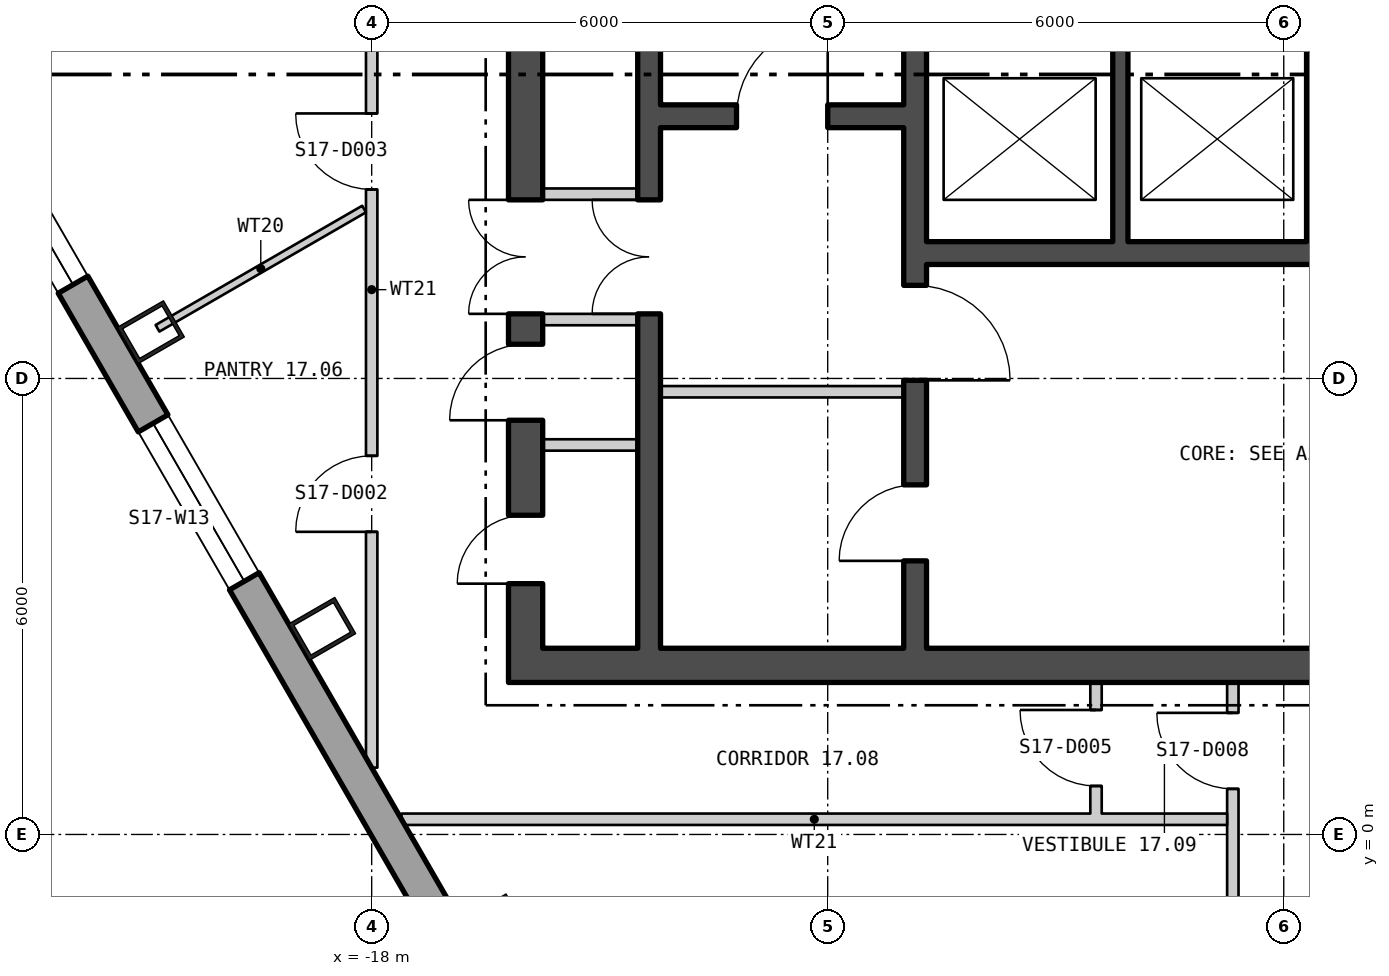
"""IFC4 building model, lengths in metres.
Left out: names, types, materials, properties, quantities, classifications, styles, units other than length and angle.
Written with IfcOpenShell. Run it as: python <this file> out.ifc"""

import sys

from ifc_helpers import new_model, si_unit, direction, frame, frame_2d, origin, origin_2d, place, context, subcontext, project, spatial, polyline, rectangle, hollow_rectangle, outline, extrude, element, fill, save


model = new_model("IFC4")
c1 = context("Model", 3, precision=1e-05, world=origin(), true_north=direction((0.0, 1.0)))
c2 = subcontext(c1, "Body", "Model", "MODEL_VIEW")
j1 = project(units=[si_unit("LENGTHUNIT", "METRE"), si_unit("PLANEANGLEUNIT", "RADIAN")], contexts=[c1])
p1 = place(None, origin())
s1 = spatial("IfcSite", under=j1, at=p1, CompositionType="ELEMENT")
p2 = place(p1, origin())
s2 = spatial("IfcBuilding", under=s1, at=p2, CompositionType="ELEMENT")
p3 = place(p2, frame((0.0, 0.0, 227.7)))
s3 = spatial("IfcBuildingStorey", under=s2, at=p3, CompositionType="ELEMENT", Elevation=227.7)
for number, where, z_axis, x_axis in (
    (1, (-20.905, 6.609, 0.0), (0.0, 0.0, 1.0), (0.5, -0.866, 0.0)),
    (2, (-18.651, 2.706, 0.0), (0.0, 0.0, 1.0), (0.5, -0.866, 0.0)),
    (3, (-16.398, -1.196, 0.0), (0.0, 0.0, 1.0), (0.5, -0.866, 0.0)),
):
    element("IfcColumn", number, at=place(p3, frame(where, z_axis=z_axis, x_axis=x_axis)), inside=s3, PredefinedType="COLUMN", context=c2, shape_type="SweptSolid", body=[
        extrude(hollow_rectangle(XDim=0.55, YDim=0.7, WallThickness=0.05, at=origin_2d()), origin(), (0.0, 0.0, 1.0), 3.9),
    ])
p4 = place(p3, frame((-26.075, 14.415, -0.18), z_axis=(0.0, 0.0, 1.0), x_axis=(0.499999194392, -0.866025868902, 0.0)))
e4 = element("IfcWall", 4, at=p4, inside=s3, PredefinedType="SOLIDWALL", context=c2, shape_type="SweptSolid", body=[
    extrude(outline(polyline([(-0.13, -0.225), (45.86, -0.225), (45.6, 0.225), (0.13, 0.225), (-0.13, -0.225)])), origin(), (0.0, 0.0, 1.0), 3.68),
])
p5 = place(p4, frame((1.424, 0.0, 1.08)))
e5 = element("IfcOpeningElement", 5, at=p5, cuts=e4, PredefinedType="OPENING", context=c2, shape_type="SweptSolid", body=[
    extrude(rectangle(XDim=2.4, YDim=2.0, at=frame_2d((1.2, 1.0))), frame((0.0, 0.235, 0.0), z_axis=(0.0, -1.0, 0.0), x_axis=(1.0, 0.0, 0.0)), (0.0, 0.0, 1.0), 0.47),
])
p6 = place(p4, frame((5.892, 0.0, 1.08)))
e6 = element("IfcOpeningElement", 6, at=p6, cuts=e4, PredefinedType="OPENING", context=c2, shape_type="SweptSolid", body=[
    extrude(rectangle(XDim=2.4, YDim=2.0, at=frame_2d((1.2, 1.0))), frame((0.0, 0.235, 0.0), z_axis=(0.0, -1.0, 0.0), x_axis=(1.0, 0.0, 0.0)), (0.0, 0.0, 1.0), 0.47),
])
p7 = place(p4, frame((10.399, 0.0, 1.08)))
e7 = element("IfcOpeningElement", 7, at=p7, cuts=e4, PredefinedType="OPENING", context=c2, shape_type="SweptSolid", body=[
    extrude(rectangle(XDim=2.4, YDim=2.0, at=frame_2d((1.2, 1.0))), frame((0.0, 0.235, 0.0), z_axis=(0.0, -1.0, 0.0), x_axis=(1.0, 0.0, 0.0)), (0.0, 0.0, 1.0), 0.47),
])
p8 = place(p4, frame((19.412, 0.0, 1.08)))
e8 = element("IfcOpeningElement", 8, at=p8, cuts=e4, PredefinedType="OPENING", context=c2, shape_type="SweptSolid", body=[
    extrude(rectangle(XDim=2.4, YDim=2.0, at=frame_2d((1.2, 1.0))), frame((0.0, 0.235, 0.0), z_axis=(0.0, -1.0, 0.0), x_axis=(1.0, 0.0, 0.0)), (0.0, 0.0, 1.0), 0.47),
])
p9 = place(p4, frame((23.918, 0.0, 1.08)))
e9 = element("IfcOpeningElement", 9, at=p9, cuts=e4, PredefinedType="OPENING", context=c2, shape_type="SweptSolid", body=[
    extrude(rectangle(XDim=2.4, YDim=2.0, at=frame_2d((1.2, 1.0))), frame((0.0, 0.235, 0.0), z_axis=(0.0, -1.0, 0.0), x_axis=(1.0, 0.0, 0.0)), (0.0, 0.0, 1.0), 0.47),
])
p10 = place(p4, frame((28.425, 0.0, 1.08)))
e10 = element("IfcOpeningElement", 10, at=p10, cuts=e4, PredefinedType="OPENING", context=c2, shape_type="SweptSolid", body=[
    extrude(rectangle(XDim=2.4, YDim=2.0, at=frame_2d((1.2, 1.0))), frame((0.0, 0.235, 0.0), z_axis=(0.0, -1.0, 0.0), x_axis=(1.0, 0.0, 0.0)), (0.0, 0.0, 1.0), 0.47),
])
p11 = place(p4, frame((32.932, 0.0, 1.08)))
e11 = element("IfcOpeningElement", 11, at=p11, cuts=e4, PredefinedType="OPENING", context=c2, shape_type="SweptSolid", body=[
    extrude(rectangle(XDim=2.4, YDim=2.0, at=frame_2d((1.2, 1.0))), frame((0.0, 0.235, 0.0), z_axis=(0.0, -1.0, 0.0), x_axis=(1.0, 0.0, 0.0)), (0.0, 0.0, 1.0), 0.47),
])
p12 = place(p4, frame((41.907, 0.0, 1.08)))
e12 = element("IfcOpeningElement", 12, at=p12, cuts=e4, PredefinedType="OPENING", context=c2, shape_type="SweptSolid", body=[
    extrude(rectangle(XDim=2.4, YDim=2.0, at=frame_2d((1.2, 1.0))), frame((0.0, 0.235, 0.0), z_axis=(0.0, -1.0, 0.0), x_axis=(1.0, 0.0, 0.0)), (0.0, 0.0, 1.0), 0.47),
])
p13 = place(p3, frame((-16.2, 2.225, 0.0), z_axis=(0.0, 0.0, 1.0), x_axis=(1.0, 0.0, 0.0)))
e13 = element("IfcWall", 13, at=p13, inside=s3, PredefinedType="SHEAR", context=c2, shape_type="SweptSolid", body=[
    extrude(rectangle(XDim=32.4, YDim=0.45, at=frame_2d((16.2, 0.0))), origin(), (0.0, 0.0, 1.0), 3.7),
])
p14 = place(p13, frame((10.7, 0.0, 0.0)))
e14 = element("IfcOpeningElement", 14, at=p14, cuts=e13, PredefinedType="OPENING", context=c2, shape_type="SweptSolid", body=[
    extrude(rectangle(XDim=1.8, YDim=2.4, at=frame_2d((0.9, 1.2))), frame((0.0, 0.235, 0.0), z_axis=(0.0, -1.0, 0.0), x_axis=(1.0, 0.0, 0.0)), (0.0, 0.0, 1.0), 0.47),
])
p15 = place(p13, frame((20.7, 0.0, 0.0)))
e15 = element("IfcOpeningElement", 15, at=p15, cuts=e13, PredefinedType="OPENING", context=c2, shape_type="SweptSolid", body=[
    extrude(rectangle(XDim=1.8, YDim=2.4, at=frame_2d((0.9, 1.2))), frame((0.0, 0.235, 0.0), z_axis=(0.0, -1.0, 0.0), x_axis=(1.0, 0.0, 0.0)), (0.0, 0.0, 1.0), 0.47),
])
p16 = place(p3, frame((-15.975, 2.45, 0.0), z_axis=(0.0, 0.0, 1.0), x_axis=(0.0, 1.0, 0.0)))
e16 = element("IfcWall", 16, at=p16, inside=s3, PredefinedType="SHEAR", context=c2, shape_type="SweptSolid", body=[
    extrude(rectangle(XDim=15.1, YDim=0.45, at=frame_2d((7.55, 0.0))), origin(), (0.0, 0.0, 1.0), 3.7),
])
p17 = place(p16, frame((4.4, 0.0, 0.0)))
e17 = element("IfcOpeningElement", 17, at=p17, cuts=e16, PredefinedType="OPENING", context=c2, shape_type="SweptSolid", body=[
    extrude(rectangle(XDim=1.5, YDim=2.1, at=frame_2d((0.75, 1.05))), frame((0.0, 0.235, 0.0), z_axis=(0.0, -1.0, 0.0), x_axis=(1.0, 0.0, 0.0)), (0.0, 0.0, 1.0), 0.47),
])
p18 = place(p16, frame((0.85, 0.0, 0.0)))
e18 = element("IfcOpeningElement", 18, at=p18, cuts=e16, PredefinedType="OPENING", context=c2, shape_type="SweptSolid", body=[
    extrude(rectangle(XDim=0.9, YDim=2.1, at=frame_2d((0.45, 1.05))), frame((0.0, 0.235, 0.0), z_axis=(0.0, -1.0, 0.0), x_axis=(1.0, 0.0, 0.0)), (0.0, 0.0, 1.0), 0.47),
])
p19 = place(p16, frame((3.0, 0.0, 0.0)))
e19 = element("IfcOpeningElement", 19, at=p19, cuts=e16, PredefinedType="OPENING", context=c2, shape_type="SweptSolid", body=[
    extrude(rectangle(XDim=1.0, YDim=2.1, at=frame_2d((0.5, 1.05))), frame((0.0, 0.235, 0.0), z_axis=(0.0, -1.0, 0.0), x_axis=(1.0, 0.0, 0.0)), (0.0, 0.0, 1.0), 0.47),
])
p20 = place(p16, frame((8.951, 0.0, 0.0)))
e20 = element("IfcOpeningElement", 20, at=p20, cuts=e16, PredefinedType="OPENING", context=c2, shape_type="SweptSolid", body=[
    extrude(rectangle(XDim=0.9, YDim=2.1, at=frame_2d((0.45, 1.05))), frame((0.0, 0.235, 0.0), z_axis=(0.0, -1.0, 0.0), x_axis=(1.0, 0.0, 0.0)), (0.0, 0.0, 1.0), 0.47),
])
p21 = place(p16, frame((13.551, 0.0, 0.0)))
e21 = element("IfcOpeningElement", 21, at=p21, cuts=e16, PredefinedType="OPENING", context=c2, shape_type="SweptSolid", body=[
    extrude(rectangle(XDim=0.9, YDim=2.1, at=frame_2d((0.45, 1.05))), frame((0.0, 0.235, 0.0), z_axis=(0.0, -1.0, 0.0), x_axis=(1.0, 0.0, 0.0)), (0.0, 0.0, 1.0), 0.47),
])
p22 = place(p3, frame((-10.85, 2.45, 0.0), z_axis=(0.0, 0.0, 1.0), x_axis=(0.0, 1.0, 0.0)))
e22 = element("IfcWall", 22, at=p22, inside=s3, PredefinedType="SHEAR", context=c2, shape_type="SweptSolid", body=[
    extrude(rectangle(XDim=15.1, YDim=0.3, at=frame_2d((7.55, 0.0))), origin(), (0.0, 0.0, 1.0), 3.7),
])
p23 = place(p22, frame((3.525, 0.0, 0.0)))
e23 = element("IfcOpeningElement", 23, at=p23, cuts=e22, PredefinedType="OPENING", context=c2, shape_type="SweptSolid", body=[
    extrude(rectangle(XDim=1.25, YDim=2.1, at=frame_2d((0.625, 1.05))), frame((0.0, 0.16, 0.0), z_axis=(0.0, -1.0, 0.0), x_axis=(1.0, 0.0, 0.0)), (0.0, 0.0, 1.0), 0.32),
])
p24 = place(p22, frame((1.15, 0.0, 0.0)))
e24 = element("IfcOpeningElement", 24, at=p24, cuts=e22, PredefinedType="OPENING", context=c2, shape_type="SweptSolid", body=[
    extrude(rectangle(XDim=1.0, YDim=2.1, at=frame_2d((0.5, 1.05))), frame((0.0, 0.16, 0.0), z_axis=(0.0, -1.0, 0.0), x_axis=(1.0, 0.0, 0.0)), (0.0, 0.0, 1.0), 0.32),
])
p25 = place(p3, frame((-14.35, 2.45, 0.0), z_axis=(0.0, 0.0, 1.0), x_axis=(0.0, 1.0, 0.0)))
e25 = element("IfcWall", 25, at=p25, inside=s3, PredefinedType="SHEAR", context=c2, shape_type="SweptSolid", body=[
    extrude(rectangle(XDim=15.1, YDim=0.3, at=frame_2d((7.55, 0.0))), origin(), (0.0, 0.0, 1.0), 3.7),
])
p26 = place(p25, frame((4.4, 0.0, 0.0)))
e26 = element("IfcOpeningElement", 26, at=p26, cuts=e25, PredefinedType="OPENING", context=c2, shape_type="SweptSolid", body=[
    extrude(rectangle(XDim=1.5, YDim=2.1, at=frame_2d((0.75, 1.05))), frame((0.0, 0.16, 0.0), z_axis=(0.0, -1.0, 0.0), x_axis=(1.0, 0.0, 0.0)), (0.0, 0.0, 1.0), 0.32),
])
p27 = place(p3, frame((-14.2, 9.45, 0.0), z_axis=(0.0, 0.0, 1.0), x_axis=(1.0, 0.0, 0.0)))
e27 = element("IfcWall", 27, at=p27, inside=s3, PredefinedType="SHEAR", context=c2, shape_type="SweptSolid", body=[
    extrude(rectangle(XDim=3.2, YDim=0.3, at=frame_2d((1.6, 0.0))), origin(), (0.0, 0.0, 1.0), 3.7),
])
p28 = place(p27, frame((1.0, 0.0, 0.0)))
e28 = element("IfcOpeningElement", 28, at=p28, cuts=e27, PredefinedType="OPENING", context=c2, shape_type="SweptSolid", body=[
    extrude(rectangle(XDim=1.2, YDim=2.1, at=frame_2d((0.6, 1.05))), frame((0.0, 0.16, 0.0), z_axis=(0.0, -1.0, 0.0), x_axis=(1.0, 0.0, 0.0)), (0.0, 0.0, 1.0), 0.32),
])
p29 = place(p3, frame((-10.7, 7.65, 0.0), z_axis=(0.0, 0.0, 1.0), x_axis=(1.0, 0.0, 0.0)))
e29 = element("IfcWall", 29, at=p29, inside=s3, PredefinedType="SHEAR", context=c2, shape_type="SweptSolid", body=[
    extrude(rectangle(XDim=10.3, YDim=0.3, at=frame_2d((5.15, 0.0))), origin(), (0.0, 0.0, 1.0), 3.7),
])
for number, where, z_axis, x_axis in (
    (30, (-8.15, 7.8, 0.0), (0.0, 0.0, 1.0), (0.0, 1.0, 0.0)),
    (31, (-5.6, 7.8, 0.0), (0.0, 0.0, 1.0), (0.0, 1.0, 0.0)),
):
    element("IfcWall", number, at=place(p3, frame(where, z_axis=z_axis, x_axis=x_axis)), inside=s3, PredefinedType="SHEAR", context=c2, shape_type="SweptSolid", body=[
        extrude(rectangle(XDim=2.7, YDim=0.2, at=frame_2d((1.35, 0.0))), origin(), (0.0, 0.0, 1.0), 3.7),
    ])
p30 = place(p3, frame((-14.2, 5.825, 0.0), z_axis=(0.0, 0.0, 1.0), x_axis=(1.0, 0.0, 0.0)))
e32 = element("IfcWall", 32, at=p30, inside=s3, PredefinedType="PARTITIONING", context=c2, shape_type="SweptSolid", body=[
    extrude(rectangle(XDim=3.2, YDim=0.15, at=frame_2d((1.6, 0.0))), origin(), (0.0, 0.0, 1.0), 3.7),
])
for number, where, z_axis, x_axis in (
    (33, (-15.75, 6.775, 0.0), (0.0, 0.0, 1.0), (1.0, 0.0, 0.0)),
    (34, (-15.75, 8.425, 0.0), (0.0, 0.0, 1.0), (1.0, 0.0, 0.0)),
    (35, (-15.75, 5.125, 0.0), (0.0, 0.0, 1.0), (1.0, 0.0, 0.0)),
):
    element("IfcWall", number, at=place(p3, frame(where, z_axis=z_axis, x_axis=x_axis)), inside=s3, PredefinedType="PARTITIONING", context=c2, shape_type="SweptSolid", body=[
        extrude(rectangle(XDim=1.25, YDim=0.15, at=frame_2d((0.625, 0.0))), origin(), (0.0, 0.0, 1.0), 3.7),
    ])
p31 = place(p3, frame((-20.818, 6.66, 0.0), z_axis=(0.0, 0.0, 1.0), x_axis=(0.866058244174, 0.499943114462, 0.0)))
e36 = element("IfcWall", 36, at=p31, inside=s3, PredefinedType="PARTITIONING", context=c2, shape_type="SweptSolid", body=[
    extrude(rectangle(XDim=3.138, YDim=0.1, at=frame_2d((1.569, 0.0))), origin(), (0.0, 0.0, 1.0), 3.7),
])
p32 = place(p3, frame((-18.0, 0.879, 0.0), z_axis=(0.0, 0.0, 1.0), x_axis=(0.0, 1.0, 0.0)))
e37 = element("IfcWall", 37, at=p32, inside=s3, PredefinedType="PARTITIONING", context=c2, shape_type="SweptSolid", body=[
    extrude(rectangle(XDim=12.579, YDim=0.15, at=frame_2d((6.29, 0.0))), origin(), (0.0, 0.0, 1.0), 3.7),
])
p33 = place(p32, frame((3.103, 0.0, 0.0)))
e38 = element("IfcOpeningElement", 38, at=p33, cuts=e37, PredefinedType="OPENING", context=c2, shape_type="SweptSolid", body=[
    extrude(rectangle(XDim=1.0, YDim=2.1, at=frame_2d((0.5, 1.05))), frame((0.0, 0.085, 0.0), z_axis=(0.0, -1.0, 0.0), x_axis=(1.0, 0.0, 0.0)), (0.0, 0.0, 1.0), 0.17),
])
p34 = place(p32, frame((7.608, 0.0, 0.0)))
e39 = element("IfcOpeningElement", 39, at=p34, cuts=e37, PredefinedType="OPENING", context=c2, shape_type="SweptSolid", body=[
    extrude(rectangle(XDim=1.0, YDim=2.1, at=frame_2d((0.5, 1.05))), frame((0.0, 0.085, 0.0), z_axis=(0.0, -1.0, 0.0), x_axis=(1.0, 0.0, 0.0)), (0.0, 0.0, 1.0), 0.17),
])
p35 = place(p3, frame((-17.608, 0.2, 0.0), z_axis=(0.0, 0.0, 1.0), x_axis=(1.0, 0.0, 0.0)))
e40 = element("IfcWall", 40, at=p35, inside=s3, PredefinedType="PARTITIONING", context=c2, shape_type="SweptSolid", body=[
    extrude(rectangle(XDim=10.863, YDim=0.15, at=frame_2d((5.431, 0.0))), origin(), (0.0, 0.0, 1.0), 3.7),
])
p36 = place(p3, frame((-8.47, 0.275, 0.0), z_axis=(0.0, 0.0, 1.0), x_axis=(0.0, 1.0, 0.0)))
e41 = element("IfcWall", 41, at=p36, inside=s3, PredefinedType="PARTITIONING", context=c2, shape_type="SweptSolid", body=[
    extrude(rectangle(XDim=1.725, YDim=0.15, at=frame_2d((0.863, 0.0))), origin(), (0.0, 0.0, 1.0), 3.7),
])
p37 = place(p36, frame((0.363, 0.0, 0.0)))
e42 = element("IfcOpeningElement", 42, at=p37, cuts=e41, PredefinedType="OPENING", context=c2, shape_type="SweptSolid", body=[
    extrude(rectangle(XDim=1.0, YDim=2.1, at=frame_2d((0.5, 1.05))), frame((0.0, 0.085, 0.0), z_axis=(0.0, -1.0, 0.0), x_axis=(1.0, 0.0, 0.0)), (0.0, 0.0, 1.0), 0.17),
])
p38 = place(p3, frame((-6.67, -3.412, 0.0), z_axis=(0.0, 0.0, 1.0), x_axis=(0.0, 1.0, 0.0)))
e43 = element("IfcWall", 43, at=p38, inside=s3, PredefinedType="PARTITIONING", context=c2, shape_type="SweptSolid", body=[
    extrude(rectangle(XDim=5.412, YDim=0.15, at=frame_2d((2.706, 0.0))), origin(), (0.0, 0.0, 1.0), 3.7),
])
p39 = place(p38, frame((4.012, 0.0, 0.0)))
e44 = element("IfcOpeningElement", 44, at=p39, cuts=e43, PredefinedType="OPENING", context=c2, shape_type="SweptSolid", body=[
    extrude(rectangle(XDim=1.0, YDim=2.1, at=frame_2d((0.5, 1.05))), frame((0.0, 0.085, 0.0), z_axis=(0.0, -1.0, 0.0), x_axis=(1.0, 0.0, 0.0)), (0.0, 0.0, 1.0), 0.17),
])
p40 = place(p6, origin())
e45 = element("IfcWindow", 45, at=p40, inside=s3, PartitioningType="SINGLE_PANEL", PredefinedType="WINDOW", context=c2, shape_type="SweptSolid", body=[
    extrude(rectangle(XDim=2.4, YDim=2.0, at=frame_2d((1.2, 1.0))), frame((0.0, 0.105, 0.0), z_axis=(0.0, -1.0, 0.0), x_axis=(1.0, 0.0, 0.0)), (0.0, 0.0, 1.0), 0.06),
])
fill(e6, e45)
p41 = place(p7, origin())
e46 = element("IfcWindow", 46, at=p41, inside=s3, PartitioningType="SINGLE_PANEL", PredefinedType="WINDOW", context=c2, shape_type="SweptSolid", body=[
    extrude(rectangle(XDim=2.4, YDim=2.0, at=frame_2d((1.2, 1.0))), frame((0.0, 0.105, 0.0), z_axis=(0.0, -1.0, 0.0), x_axis=(1.0, 0.0, 0.0)), (0.0, 0.0, 1.0), 0.06),
])
fill(e7, e46)
p42 = place(p28, origin())
e47 = element("IfcDoor", 47, at=p42, inside=s3, OperationType="SINGLE_SWING_LEFT", PredefinedType="DOOR", context=c2, shape_type="SweptSolid", body=[
    extrude(rectangle(XDim=1.2, YDim=2.1, at=frame_2d((0.6, 1.05))), frame((0.0, 0.025, 0.0), z_axis=(0.0, -1.0, 0.0), x_axis=(1.0, 0.0, 0.0)), (0.0, 0.0, 1.0), 0.05),
])
fill(e28, e47)
p43 = place(p23, origin())
e48 = element("IfcDoor", 48, at=p43, inside=s3, OperationType="SINGLE_SWING_LEFT", PredefinedType="DOOR", context=c2, shape_type="SweptSolid", body=[
    extrude(rectangle(XDim=1.25, YDim=2.1, at=frame_2d((0.625, 1.05))), frame((0.0, 0.025, 0.0), z_axis=(0.0, -1.0, 0.0), x_axis=(1.0, 0.0, 0.0)), (0.0, 0.0, 1.0), 0.05),
])
fill(e23, e48)
p44 = place(p24, origin())
e49 = element("IfcDoor", 49, at=p44, inside=s3, OperationType="SINGLE_SWING_RIGHT", PredefinedType="DOOR", context=c2, shape_type="SweptSolid", body=[
    extrude(rectangle(XDim=1.0, YDim=2.1, at=frame_2d((0.5, 1.05))), frame((0.0, 0.025, 0.0), z_axis=(0.0, -1.0, 0.0), x_axis=(1.0, 0.0, 0.0)), (0.0, 0.0, 1.0), 0.05),
])
fill(e24, e49)
p45 = place(p26, origin())
e50 = element("IfcDoor", 50, at=p45, inside=s3, OperationType="DOUBLE_DOOR_SINGLE_SWING", PredefinedType="DOOR", context=c2, shape_type="SweptSolid", body=[
    extrude(rectangle(XDim=1.5, YDim=2.1, at=frame_2d((0.75, 1.05))), frame((0.0, 0.025, 0.0), z_axis=(0.0, -1.0, 0.0), x_axis=(1.0, 0.0, 0.0)), (0.0, 0.0, 1.0), 0.05),
])
fill(e26, e50)
p46 = place(p17, origin())
e51 = element("IfcDoor", 51, at=p46, inside=s3, OperationType="DOUBLE_DOOR_SINGLE_SWING", PredefinedType="DOOR", context=c2, shape_type="SweptSolid", body=[
    extrude(rectangle(XDim=1.5, YDim=2.1, at=frame_2d((0.75, 1.05))), frame((0.0, 0.025, 0.0), z_axis=(0.0, -1.0, 0.0), x_axis=(1.0, 0.0, 0.0)), (0.0, 0.0, 1.0), 0.05),
])
fill(e17, e51)
p47 = place(p18, origin())
e52 = element("IfcDoor", 52, at=p47, inside=s3, OperationType="SINGLE_SWING_RIGHT", PredefinedType="DOOR", context=c2, shape_type="SweptSolid", body=[
    extrude(rectangle(XDim=0.9, YDim=2.1, at=frame_2d((0.45, 1.05))), frame((0.0, 0.025, 0.0), z_axis=(0.0, -1.0, 0.0), x_axis=(1.0, 0.0, 0.0)), (0.0, 0.0, 1.0), 0.05),
])
fill(e18, e52)
p48 = place(p19, origin())
e53 = element("IfcDoor", 53, at=p48, inside=s3, OperationType="SINGLE_SWING_RIGHT", PredefinedType="DOOR", context=c2, shape_type="SweptSolid", body=[
    extrude(rectangle(XDim=1.0, YDim=2.1, at=frame_2d((0.5, 1.05))), frame((0.0, 0.025, 0.0), z_axis=(0.0, -1.0, 0.0), x_axis=(1.0, 0.0, 0.0)), (0.0, 0.0, 1.0), 0.05),
])
fill(e19, e53)
p49 = place(p33, origin())
e54 = element("IfcDoor", 54, at=p49, inside=s3, OperationType="SINGLE_SWING_RIGHT", PredefinedType="DOOR", context=c2, shape_type="SweptSolid", body=[
    extrude(rectangle(XDim=1.0, YDim=2.1, at=frame_2d((0.5, 1.05))), frame((0.0, 0.025, 0.0), z_axis=(0.0, -1.0, 0.0), x_axis=(1.0, 0.0, 0.0)), (0.0, 0.0, 1.0), 0.05),
])
fill(e38, e54)
p50 = place(p34, origin())
e55 = element("IfcDoor", 55, at=p50, inside=s3, OperationType="SINGLE_SWING_LEFT", PredefinedType="DOOR", context=c2, shape_type="SweptSolid", body=[
    extrude(rectangle(XDim=1.0, YDim=2.1, at=frame_2d((0.5, 1.05))), frame((0.0, 0.025, 0.0), z_axis=(0.0, -1.0, 0.0), x_axis=(1.0, 0.0, 0.0)), (0.0, 0.0, 1.0), 0.05),
])
fill(e39, e55)
p51 = place(p37, origin())
e56 = element("IfcDoor", 56, at=p51, inside=s3, OperationType="SINGLE_SWING_LEFT", PredefinedType="DOOR", context=c2, shape_type="SweptSolid", body=[
    extrude(rectangle(XDim=1.0, YDim=2.1, at=frame_2d((0.5, 1.05))), frame((0.0, 0.025, 0.0), z_axis=(0.0, -1.0, 0.0), x_axis=(1.0, 0.0, 0.0)), (0.0, 0.0, 1.0), 0.05),
])
fill(e42, e56)
p52 = place(p39, origin())
e57 = element("IfcDoor", 57, at=p52, inside=s3, OperationType="SINGLE_SWING_LEFT", PredefinedType="DOOR", context=c2, shape_type="SweptSolid", body=[
    extrude(rectangle(XDim=1.0, YDim=2.1, at=frame_2d((0.5, 1.05))), frame((0.0, 0.025, 0.0), z_axis=(0.0, -1.0, 0.0), x_axis=(1.0, 0.0, 0.0)), (0.0, 0.0, 1.0), 0.05),
])
fill(e44, e57)
save(model, sys.argv[1])
